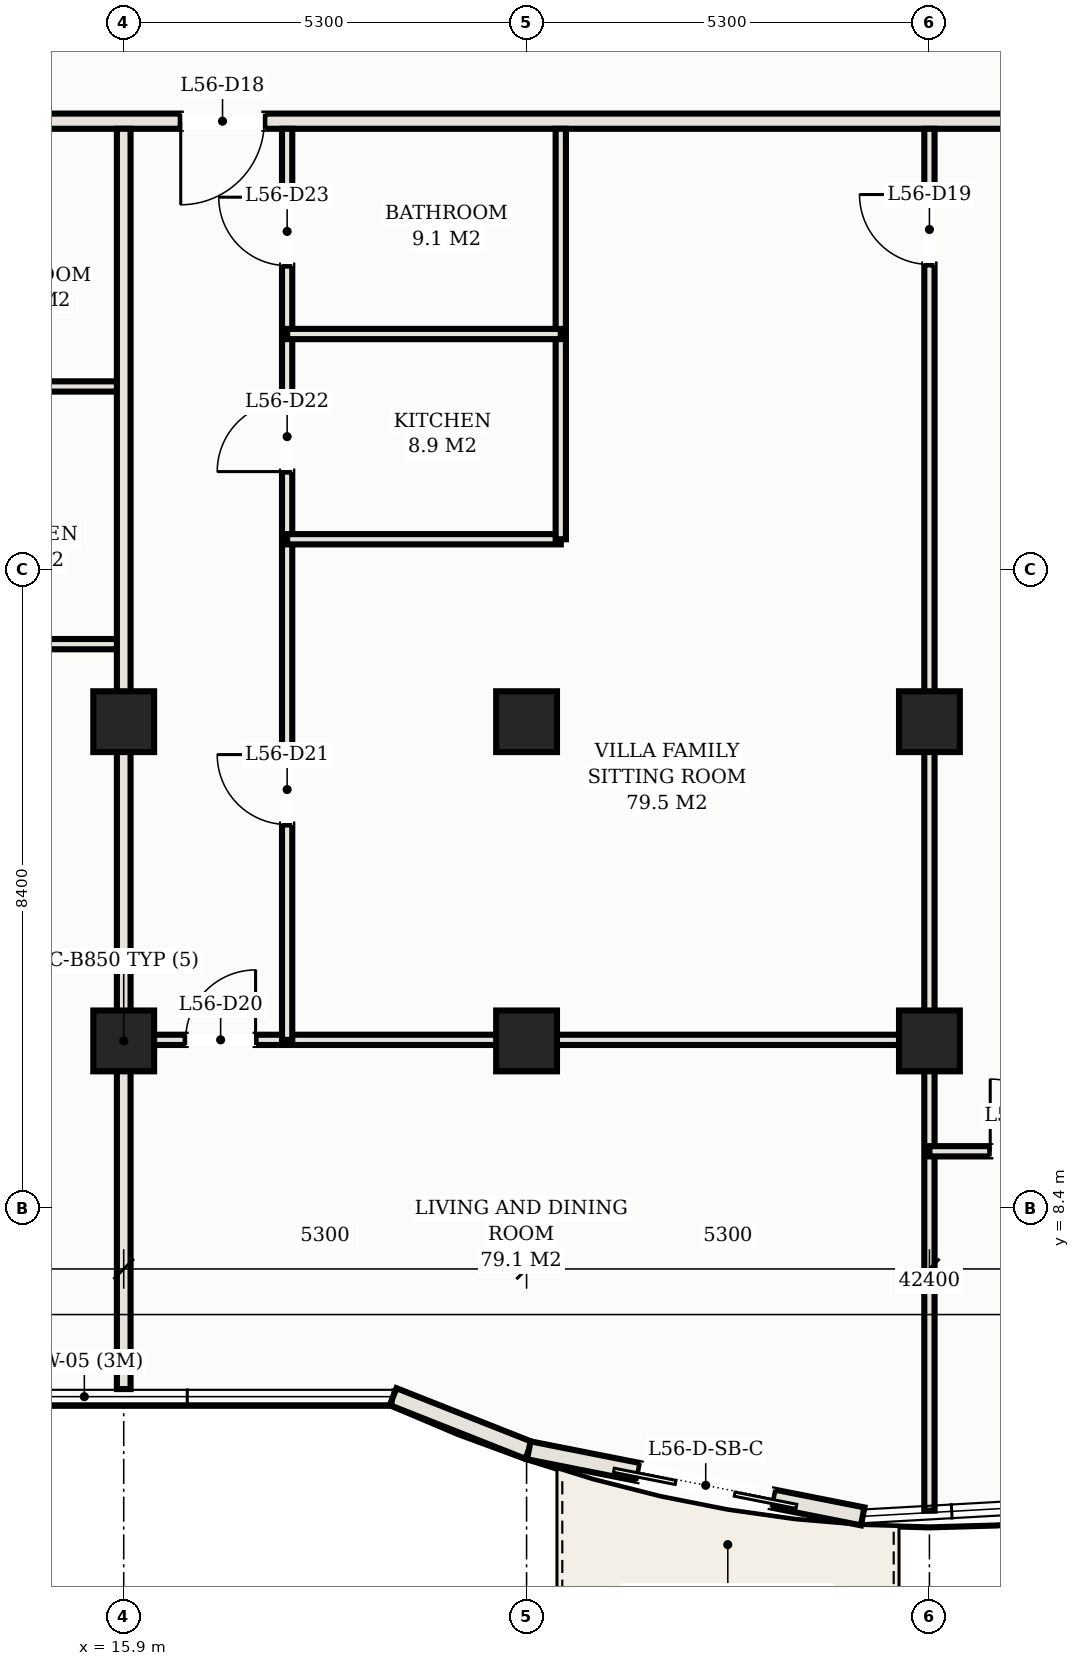
"""IFC4 building model, lengths in metres.
Left out: names, types, materials, properties, quantities, classifications, styles, units other than length and angle.
Written with IfcOpenShell. Run it as: python <this file> out.ifc"""

import sys

from ifc_helpers import new_model, si_unit, direction, frame, frame_2d, origin, origin_2d, place, context, subcontext, project, spatial, rectangle, hollow_rectangle, extrude, element, fill, save


model = new_model("IFC4")
c1 = context("Model", 3, precision=1e-05, world=origin(), true_north=direction((0.0, 1.0)))
c2 = subcontext(c1, "Body", "Model", "MODEL_VIEW")
j1 = project(units=[si_unit("LENGTHUNIT", "METRE"), si_unit("PLANEANGLEUNIT", "RADIAN")], contexts=[c1])
p1 = place(None, origin())
s1 = spatial("IfcSite", under=j1, at=p1, CompositionType="ELEMENT")
p2 = place(p1, origin())
s2 = spatial("IfcBuilding", under=s1, at=p2, CompositionType="ELEMENT")
p3 = place(p2, frame((0.0, 0.0, 206.6)))
s3 = spatial("IfcBuildingStorey", under=s2, at=p3, CompositionType="ELEMENT", Elevation=206.6)
for number, where, z_axis, x_axis in (
    (1, (15.9, 14.8, 0.0), (0.0, 0.0, 1.0), (1.0, 0.0, 0.0)),
    (2, (15.9, 10.6, 0.0), (0.0, 0.0, 1.0), (1.0, 0.0, 0.0)),
    (3, (21.2, 14.8, 0.0), (0.0, 0.0, 1.0), (1.0, 0.0, 0.0)),
    (4, (21.2, 10.6, 0.0), (0.0, 0.0, 1.0), (1.0, 0.0, 0.0)),
    (5, (26.5, 14.8, 0.0), (0.0, 0.0, 1.0), (1.0, 0.0, 0.0)),
    (6, (26.5, 10.6, 0.0), (0.0, 0.0, 1.0), (1.0, 0.0, 0.0)),
):
    element("IfcColumn", number, at=place(p3, frame(where, z_axis=z_axis, x_axis=x_axis)), inside=s3, PredefinedType="COLUMN", context=c2, shape_type="SweptSolid", body=[
        extrude(hollow_rectangle(XDim=0.8, YDim=0.8, WallThickness=0.028, at=origin_2d()), origin(), (0.0, 0.0, 1.0), 3.3),
    ])
p4 = place(p3, frame((19.444, 5.92, 0.0), z_axis=(0.0, 0.0, 1.0), x_axis=(0.92993442177, -0.367725401906, 0.0)))
e7 = element("IfcWall", 7, at=p4, inside=s3, PredefinedType="SOLIDWALL", context=c2, shape_type="SweptSolid", body=[
    extrude(rectangle(XDim=1.919, YDim=0.24, at=frame_2d((0.96, 0.0))), origin(), (0.0, 0.0, 1.0), 3.11),
])
p5 = place(p3, frame((21.229, 5.214, 0.0), z_axis=(0.0, 0.0, 1.0), x_axis=(0.980985349685, -0.194081796425, 0.0)))
e8 = element("IfcWall", 8, at=p5, inside=s3, PredefinedType="SOLIDWALL", context=c2, shape_type="SweptSolid", body=[
    extrude(rectangle(XDim=4.478, YDim=0.24, at=frame_2d((2.239, 0.0))), origin(), (0.0, 0.0, 1.0), 3.11),
])
p6 = place(p5, frame((1.473, 0.0, 0.0)))
e9 = element("IfcOpeningElement", 9, at=p6, cuts=e8, PredefinedType="OPENING", context=c2, shape_type="SweptSolid", body=[
    extrude(rectangle(XDim=1.8, YDim=2.2, at=frame_2d((0.9, 1.1))), frame((0.0, 0.13, 0.0), z_axis=(0.0, -1.0, 0.0), x_axis=(1.0, 0.0, 0.0)), (0.0, 0.0, 1.0), 0.26),
])
p7 = place(p3, frame((6.72, 22.7, 0.0), z_axis=(0.0, 0.0, 1.0), x_axis=(1.0, 0.0, 0.0)))
e10 = element("IfcWall", 10, at=p7, inside=s3, PredefinedType="PARTITIONING", context=c2, shape_type="SweptSolid", body=[
    extrude(rectangle(XDim=39.56, YDim=0.2, at=frame_2d((19.78, 0.0))), origin(), (0.0, 0.0, 1.0), 2.43),
])
p8 = place(p7, frame((4.63, 0.0, 0.0)))
e11 = element("IfcOpeningElement", 11, at=p8, cuts=e10, PredefinedType="OPENING", context=c2, shape_type="SweptSolid", body=[
    extrude(rectangle(XDim=1.1, YDim=2.25, at=frame_2d((0.55, 1.125))), frame((0.0, 0.11, 0.0), z_axis=(0.0, -1.0, 0.0), x_axis=(1.0, 0.0, 0.0)), (0.0, 0.0, 1.0), 0.22),
])
p9 = place(p7, frame((9.93, 0.0, 0.0)))
e12 = element("IfcOpeningElement", 12, at=p9, cuts=e10, PredefinedType="OPENING", context=c2, shape_type="SweptSolid", body=[
    extrude(rectangle(XDim=1.1, YDim=2.25, at=frame_2d((0.55, 1.125))), frame((0.0, 0.11, 0.0), z_axis=(0.0, -1.0, 0.0), x_axis=(1.0, 0.0, 0.0)), (0.0, 0.0, 1.0), 0.22),
])
p10 = place(p7, frame((25.83, 0.0, 0.0)))
e13 = element("IfcOpeningElement", 13, at=p10, cuts=e10, PredefinedType="OPENING", context=c2, shape_type="SweptSolid", body=[
    extrude(rectangle(XDim=1.1, YDim=2.25, at=frame_2d((0.55, 1.125))), frame((0.0, 0.11, 0.0), z_axis=(0.0, -1.0, 0.0), x_axis=(1.0, 0.0, 0.0)), (0.0, 0.0, 1.0), 0.22),
])
p11 = place(p7, frame((1.435, 0.0, 0.0)))
e14 = element("IfcOpeningElement", 14, at=p11, cuts=e10, PredefinedType="OPENING", context=c2, shape_type="SweptSolid", body=[
    extrude(rectangle(XDim=0.92, YDim=2.15, at=frame_2d((0.46, 1.075))), frame((0.0, 0.11, 0.0), z_axis=(0.0, -1.0, 0.0), x_axis=(1.0, 0.0, 0.0)), (0.0, 0.0, 1.0), 0.22),
])
p12 = place(p7, frame((37.205, 0.0, 0.0)))
e15 = element("IfcOpeningElement", 15, at=p12, cuts=e10, PredefinedType="OPENING", context=c2, shape_type="SweptSolid", body=[
    extrude(rectangle(XDim=0.92, YDim=2.15, at=frame_2d((0.46, 1.075))), frame((0.0, 0.11, 0.0), z_axis=(0.0, -1.0, 0.0), x_axis=(1.0, 0.0, 0.0)), (0.0, 0.0, 1.0), 0.22),
])
for number, where, z_axis, x_axis in (
    (16, (12.75, 15.82, 0.0), (0.0, 0.0, 1.0), (1.0, 0.0, 0.0)),
    (17, (12.75, 19.21, 0.0), (0.0, 0.0, 1.0), (1.0, 0.0, 0.0)),
):
    element("IfcWall", number, at=place(p3, frame(where, z_axis=z_axis, x_axis=x_axis)), inside=s3, PredefinedType="PARTITIONING", context=c2, shape_type="SweptSolid", body=[
        extrude(rectangle(XDim=3.15, YDim=0.135, at=frame_2d((1.575, 0.0))), origin(), (0.0, 0.0, 1.0), 2.43),
    ])
p13 = place(p3, frame((15.9, 6.02, 0.0), z_axis=(0.0, 0.0, 1.0), x_axis=(0.0, 1.0, 0.0)))
e18 = element("IfcWall", 18, at=p13, inside=s3, PredefinedType="PARTITIONING", context=c2, shape_type="SweptSolid", body=[
    extrude(rectangle(XDim=16.58, YDim=0.18, at=frame_2d((8.29, 0.0))), origin(), (0.0, 0.0, 1.0), 2.43),
])
p14 = place(p3, frame((26.5, 4.42, 0.0), z_axis=(0.0, 0.0, 1.0), x_axis=(0.0, 1.0, 0.0)))
e19 = element("IfcWall", 19, at=p14, inside=s3, PredefinedType="PARTITIONING", context=c2, shape_type="SweptSolid", body=[
    extrude(rectangle(XDim=18.18, YDim=0.135, at=frame_2d((9.09, 0.0))), origin(), (0.0, 0.0, 1.0), 2.43),
])
p15 = place(p14, frame((16.395, 0.0, 0.0)))
e20 = element("IfcOpeningElement", 20, at=p15, cuts=e19, PredefinedType="OPENING", context=c2, shape_type="SweptSolid", body=[
    extrude(rectangle(XDim=0.92, YDim=2.15, at=frame_2d((0.46, 1.075))), frame((0.0, 0.078, 0.0), z_axis=(0.0, -1.0, 0.0), x_axis=(1.0, 0.0, 0.0)), (0.0, 0.0, 1.0), 0.155),
])
p16 = place(p3, frame((15.9, 10.614, 0.0), z_axis=(0.0, 0.0, 1.0), x_axis=(1.0, 0.0, 0.0)))
e21 = element("IfcWall", 21, at=p16, inside=s3, PredefinedType="PARTITIONING", context=c2, shape_type="SweptSolid", body=[
    extrude(rectangle(XDim=10.6, YDim=0.135, at=frame_2d((5.3, 0.0))), origin(), (0.0, 0.0, 1.0), 2.43),
])
p17 = place(p16, frame((0.815, 0.0, 0.0)))
e22 = element("IfcOpeningElement", 22, at=p17, cuts=e21, PredefinedType="OPENING", context=c2, shape_type="SweptSolid", body=[
    extrude(rectangle(XDim=0.92, YDim=2.15, at=frame_2d((0.46, 1.075))), frame((0.0, 0.078, 0.0), z_axis=(0.0, -1.0, 0.0), x_axis=(1.0, 0.0, 0.0)), (0.0, 0.0, 1.0), 0.155),
])
p18 = place(p3, frame((18.05, 10.614, 0.0), z_axis=(0.0, 0.0, 1.0), x_axis=(0.0, 1.0, 0.0)))
e23 = element("IfcWall", 23, at=p18, inside=s3, PredefinedType="PARTITIONING", context=c2, shape_type="SweptSolid", body=[
    extrude(rectangle(XDim=11.986, YDim=0.135, at=frame_2d((5.993, 0.0))), origin(), (0.0, 0.0, 1.0), 2.43),
])
p19 = place(p18, frame((2.833, 0.0, 0.0)))
e24 = element("IfcOpeningElement", 24, at=p19, cuts=e23, PredefinedType="OPENING", context=c2, shape_type="SweptSolid", body=[
    extrude(rectangle(XDim=0.92, YDim=2.15, at=frame_2d((0.46, 1.075))), frame((0.0, 0.078, 0.0), z_axis=(0.0, -1.0, 0.0), x_axis=(1.0, 0.0, 0.0)), (0.0, 0.0, 1.0), 0.155),
])
p20 = place(p18, frame((7.476, 0.0, 0.0)))
e25 = element("IfcOpeningElement", 25, at=p20, cuts=e23, PredefinedType="OPENING", context=c2, shape_type="SweptSolid", body=[
    extrude(rectangle(XDim=0.92, YDim=2.15, at=frame_2d((0.46, 1.075))), frame((0.0, 0.078, 0.0), z_axis=(0.0, -1.0, 0.0), x_axis=(1.0, 0.0, 0.0)), (0.0, 0.0, 1.0), 0.155),
])
p21 = place(p18, frame((10.186, 0.0, 0.0)))
e26 = element("IfcOpeningElement", 26, at=p21, cuts=e23, PredefinedType="OPENING", context=c2, shape_type="SweptSolid", body=[
    extrude(rectangle(XDim=0.9, YDim=2.15, at=frame_2d((0.45, 1.075))), frame((0.0, 0.078, 0.0), z_axis=(0.0, -1.0, 0.0), x_axis=(1.0, 0.0, 0.0)), (0.0, 0.0, 1.0), 0.155),
])
p22 = place(p3, frame((18.05, 17.2, 0.0), z_axis=(0.0, 0.0, 1.0), x_axis=(1.0, 0.0, 0.0)))
e27 = element("IfcWall", 27, at=p22, inside=s3, PredefinedType="PARTITIONING", context=c2, shape_type="SweptSolid", body=[
    extrude(rectangle(XDim=3.6, YDim=0.135, at=frame_2d((1.8, 0.0))), origin(), (0.0, 0.0, 1.0), 2.43),
])
p23 = place(p3, frame((21.65, 17.2, 0.0), z_axis=(0.0, 0.0, 1.0), x_axis=(0.0, 1.0, 0.0)))
e28 = element("IfcWall", 28, at=p23, inside=s3, PredefinedType="PARTITIONING", context=c2, shape_type="SweptSolid", body=[
    extrude(rectangle(XDim=5.4, YDim=0.135, at=frame_2d((2.7, 0.0))), origin(), (0.0, 0.0, 1.0), 2.43),
])
p24 = place(p3, frame((18.05, 19.9, 0.0), z_axis=(0.0, 0.0, 1.0), x_axis=(1.0, 0.0, 0.0)))
e29 = element("IfcWall", 29, at=p24, inside=s3, PredefinedType="PARTITIONING", context=c2, shape_type="SweptSolid", body=[
    extrude(rectangle(XDim=3.6, YDim=0.135, at=frame_2d((1.8, 0.0))), origin(), (0.0, 0.0, 1.0), 2.43),
])
p25 = place(p3, frame((26.5, 9.148, 0.0), z_axis=(0.0, 0.0, 1.0), x_axis=(1.0, 0.0, 0.0)))
e30 = element("IfcWall", 30, at=p25, inside=s3, PredefinedType="PARTITIONING", context=c2, shape_type="SweptSolid", body=[
    extrude(rectangle(XDim=5.3, YDim=0.135, at=frame_2d((2.65, 0.0))), origin(), (0.0, 0.0, 1.0), 2.43),
])
p26 = place(p25, frame((0.8, 0.0, 0.0)))
e31 = element("IfcOpeningElement", 31, at=p26, cuts=e30, PredefinedType="OPENING", context=c2, shape_type="SweptSolid", body=[
    extrude(rectangle(XDim=0.95, YDim=2.15, at=frame_2d((0.475, 1.075))), frame((0.0, 0.078, 0.0), z_axis=(0.0, -1.0, 0.0), x_axis=(1.0, 0.0, 0.0)), (0.0, 0.0, 1.0), 0.155),
])
p27 = place(p25, frame((3.275, 0.0, 0.0)))
e32 = element("IfcOpeningElement", 32, at=p27, cuts=e30, PredefinedType="OPENING", context=c2, shape_type="SweptSolid", body=[
    extrude(rectangle(XDim=0.9, YDim=2.15, at=frame_2d((0.45, 1.075))), frame((0.0, 0.078, 0.0), z_axis=(0.0, -1.0, 0.0), x_axis=(1.0, 0.0, 0.0)), (0.0, 0.0, 1.0), 0.155),
])
p28 = place(p6, frame((1.8, 0.0, 0.0), z_axis=(0.0, 0.0, 1.0), x_axis=(-1.0, 0.0, 0.0)))
e33 = element("IfcDoor", 33, at=p28, inside=s3, OperationType="DOUBLE_DOOR_SLIDING", PredefinedType="DOOR", context=c2, shape_type="SweptSolid", body=[
    extrude(rectangle(XDim=1.8, YDim=2.2, at=frame_2d((0.9, 1.1))), frame((0.0, 0.025, 0.0), z_axis=(0.0, -1.0, 0.0), x_axis=(1.0, 0.0, 0.0)), (0.0, 0.0, 1.0), 0.05),
])
fill(e9, e33)
p29 = place(p9, frame((1.1, 0.0, 0.0), z_axis=(0.0, 0.0, 1.0), x_axis=(-1.0, 0.0, 0.0)))
e34 = element("IfcDoor", 34, at=p29, inside=s3, OperationType="SINGLE_SWING_RIGHT", PredefinedType="DOOR", context=c2, shape_type="SweptSolid", body=[
    extrude(rectangle(XDim=1.1, YDim=2.25, at=frame_2d((0.55, 1.125))), frame((0.0, 0.025, 0.0), z_axis=(0.0, -1.0, 0.0), x_axis=(1.0, 0.0, 0.0)), (0.0, 0.0, 1.0), 0.05),
])
fill(e12, e34)
p30 = place(p15, origin())
e35 = element("IfcDoor", 35, at=p30, inside=s3, OperationType="SINGLE_SWING_RIGHT", PredefinedType="DOOR", context=c2, shape_type="SweptSolid", body=[
    extrude(rectangle(XDim=0.92, YDim=2.15, at=frame_2d((0.46, 1.075))), frame((0.0, 0.025, 0.0), z_axis=(0.0, -1.0, 0.0), x_axis=(1.0, 0.0, 0.0)), (0.0, 0.0, 1.0), 0.05),
])
fill(e20, e35)
p31 = place(p17, origin())
e36 = element("IfcDoor", 36, at=p31, inside=s3, OperationType="SINGLE_SWING_RIGHT", PredefinedType="DOOR", context=c2, shape_type="SweptSolid", body=[
    extrude(rectangle(XDim=0.92, YDim=2.15, at=frame_2d((0.46, 1.075))), frame((0.0, 0.025, 0.0), z_axis=(0.0, -1.0, 0.0), x_axis=(1.0, 0.0, 0.0)), (0.0, 0.0, 1.0), 0.05),
])
fill(e22, e36)
p32 = place(p19, origin())
e37 = element("IfcDoor", 37, at=p32, inside=s3, OperationType="SINGLE_SWING_RIGHT", PredefinedType="DOOR", context=c2, shape_type="SweptSolid", body=[
    extrude(rectangle(XDim=0.92, YDim=2.15, at=frame_2d((0.46, 1.075))), frame((0.0, 0.025, 0.0), z_axis=(0.0, -1.0, 0.0), x_axis=(1.0, 0.0, 0.0)), (0.0, 0.0, 1.0), 0.05),
])
fill(e24, e37)
p33 = place(p20, origin())
e38 = element("IfcDoor", 38, at=p33, inside=s3, OperationType="SINGLE_SWING_LEFT", PredefinedType="DOOR", context=c2, shape_type="SweptSolid", body=[
    extrude(rectangle(XDim=0.92, YDim=2.15, at=frame_2d((0.46, 1.075))), frame((0.0, 0.025, 0.0), z_axis=(0.0, -1.0, 0.0), x_axis=(1.0, 0.0, 0.0)), (0.0, 0.0, 1.0), 0.05),
])
fill(e25, e38)
p34 = place(p21, origin())
e39 = element("IfcDoor", 39, at=p34, inside=s3, OperationType="SINGLE_SWING_RIGHT", PredefinedType="DOOR", context=c2, shape_type="SweptSolid", body=[
    extrude(rectangle(XDim=0.9, YDim=2.15, at=frame_2d((0.45, 1.075))), frame((0.0, 0.025, 0.0), z_axis=(0.0, -1.0, 0.0), x_axis=(1.0, 0.0, 0.0)), (0.0, 0.0, 1.0), 0.05),
])
fill(e26, e39)
p35 = place(p26, origin())
e40 = element("IfcDoor", 40, at=p35, inside=s3, OperationType="SINGLE_SWING_LEFT", PredefinedType="DOOR", context=c2, shape_type="SweptSolid", body=[
    extrude(rectangle(XDim=0.95, YDim=2.15, at=frame_2d((0.475, 1.075))), frame((0.0, 0.025, 0.0), z_axis=(0.0, -1.0, 0.0), x_axis=(1.0, 0.0, 0.0)), (0.0, 0.0, 1.0), 0.05),
])
fill(e31, e40)
save(model, sys.argv[1])
